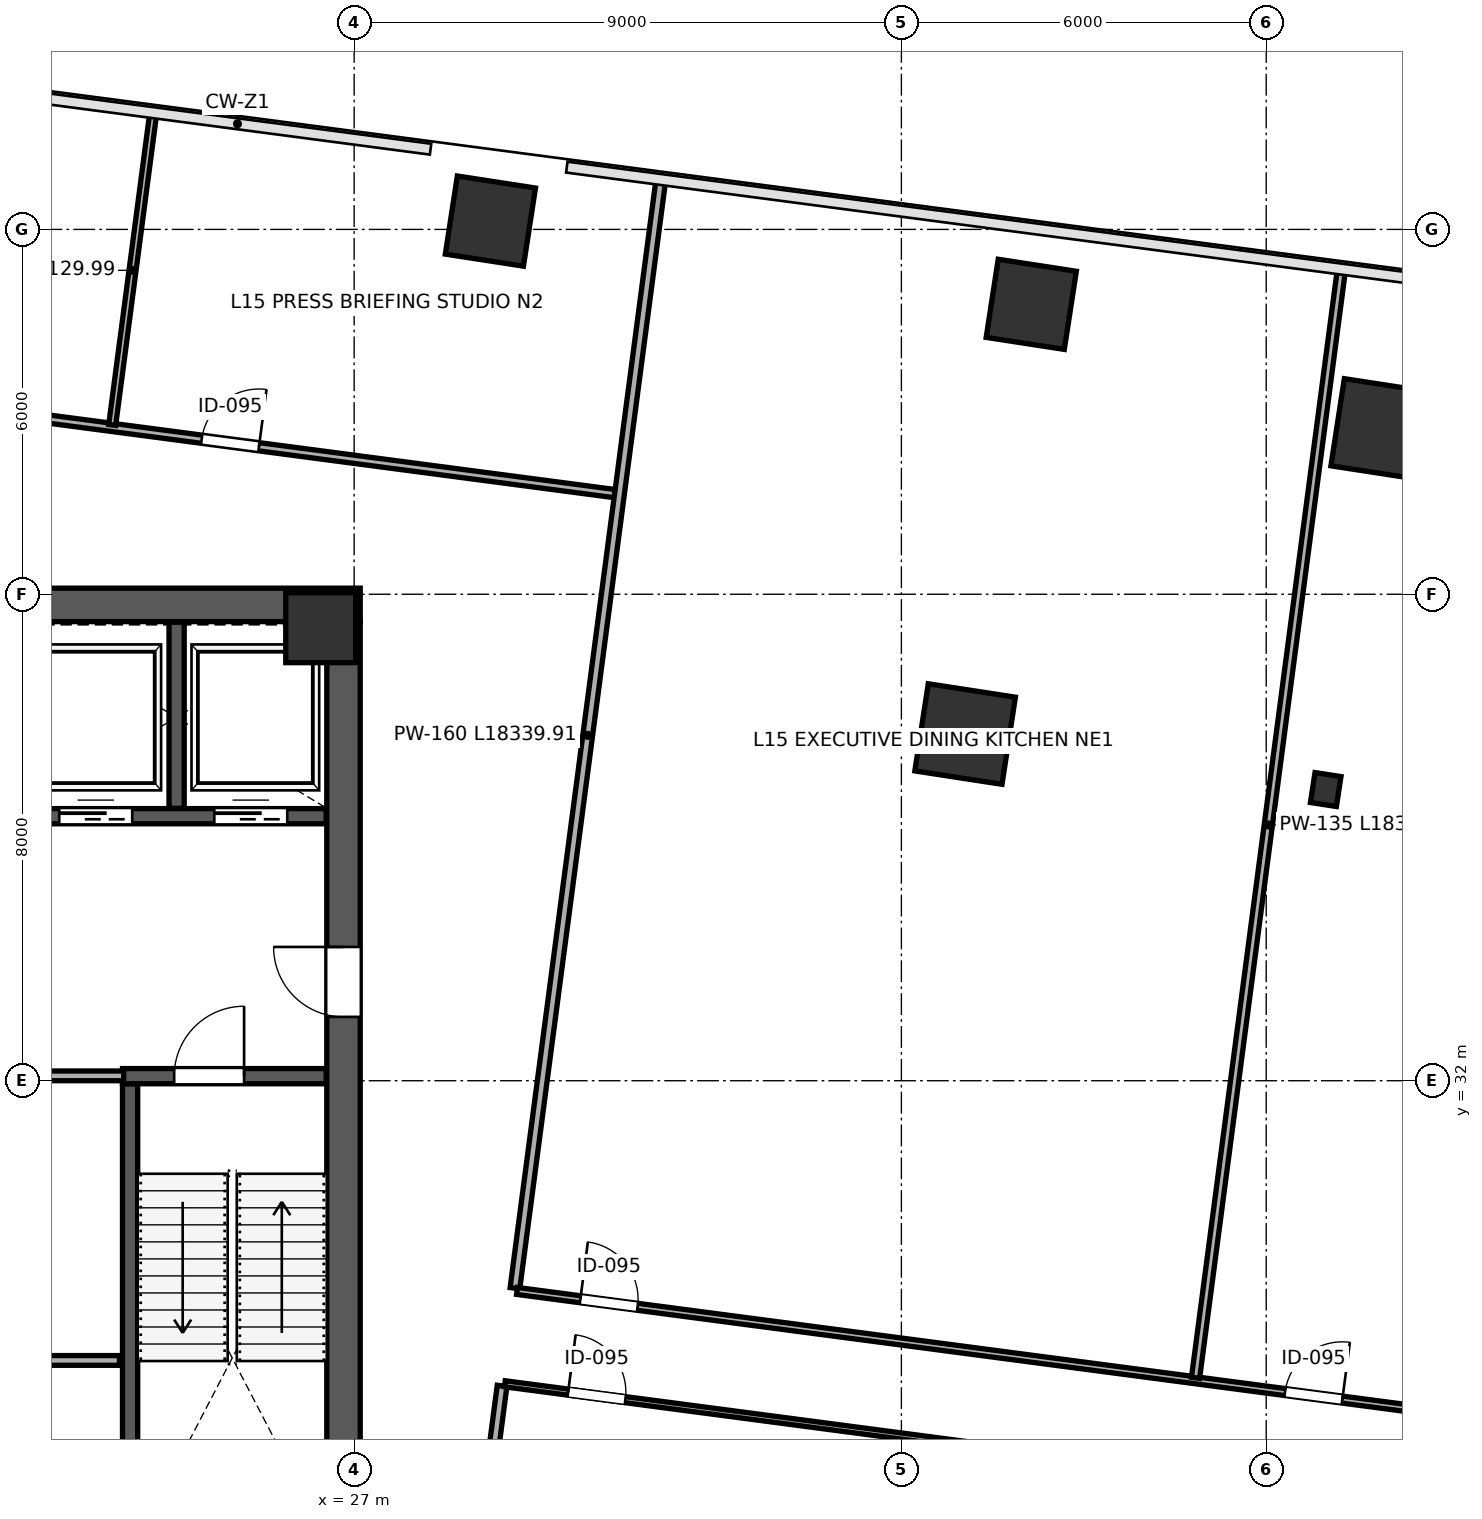
"""IFC4 building model, lengths in metres.
Left out: names, types, materials, properties, quantities, classifications, styles, units other than length and angle.
Written with IfcOpenShell. Run it as: python <this file> out.ifc"""

import sys

from ifc_helpers import new_model, si_unit, direction, frame, frame_2d, origin, origin_2d, place, context, subcontext, project, spatial, rectangle, i_section, extrude, clip, halfspace, source, transform, mapped, element, fill, save


model = new_model("IFC4")
c1 = context("Model", 3, precision=1e-05, world=origin(), true_north=direction((0.0, 1.0)))
c2 = subcontext(c1, "Body", "Model", "MODEL_VIEW")
j1 = project(units=[si_unit("LENGTHUNIT", "METRE"), si_unit("PLANEANGLEUNIT", "RADIAN")], contexts=[c1])
p1 = place(None, origin())
s1 = spatial("IfcSite", under=j1, at=p1, CompositionType="ELEMENT")
p2 = place(p1, origin())
s2 = spatial("IfcBuilding", under=s1, at=p2, CompositionType="ELEMENT")
p3 = place(p2, frame((0.0, 0.0, 70.6)))
s3 = spatial("IfcBuildingStorey", under=s2, at=p3, CompositionType="ELEMENT", Elevation=70.6)
m1 = source(origin(), c2, "Body", "SweptSolid", [
    extrude(rectangle(XDim=1.15, YDim=1.15, at=origin_2d()), origin(), (0.0, 0.0, 1.0), 4.198),
])
p4 = place(p3, frame((26.45, 39.45, 0.001), z_axis=(0.0, 0.0, 1.0), x_axis=(1.0, 0.0, 0.0)))
e1 = element("IfcColumn", 1, at=p4, inside=s3, PredefinedType="COLUMN", context=c2, shape_type="MappedRepresentation", body=[
    mapped(m1, transform((0.0, 0.0, 0.0), scale=1.0)),
])
p5 = place(p3, frame((29.241, 46.137, 0.0), z_axis=(0.072698336794, -0.04083850792, 0.996517520216), x_axis=(-0.61623373126, -0.787461166869, 0.012684602109)))
e2 = element("IfcColumn", 2, at=p5, inside=s3, PredefinedType="COLUMN", context=c2, shape_type="Clipping", body=[
    clip(clip(extrude(rectangle(XDim=1.3, YDim=1.3, at=origin_2d()), origin(), (0.0, 0.0, 1.0), 4.215), halfspace(frame((0.0, 0.0, 0.063), z_axis=(0.0, 0.0, -1.0), x_axis=(1.0, 0.0, 0.0)), False)), halfspace(frame((0.0, 0.0, 4.152), z_axis=(0.0, 0.0, 1.0), x_axis=(1.0, 0.0, 0.0)), False)),
])
p6 = place(p3, frame((37.048, 37.701, 0.0), z_axis=(0.028668122847, -0.080791982568, 0.996318620866), x_axis=(-0.982143590561, -0.18768030183, 0.013041158884)))
e3 = element("IfcColumn", 3, at=p6, inside=s3, PredefinedType="COLUMN", context=c2, shape_type="Clipping", body=[
    clip(clip(extrude(rectangle(XDim=1.45, YDim=1.45, at=origin_2d()), origin(), (0.0, 0.0, 1.0), 4.216), halfspace(frame((0.0, 0.0, 0.072), z_axis=(0.0, 0.0, -1.0), x_axis=(1.0, 0.0, 0.0)), False)), halfspace(frame((0.0, 0.0, 4.144), z_axis=(0.0, 0.0, 1.0), x_axis=(1.0, 0.0, 0.0)), False)),
])
p7 = place(p3, frame((38.136, 44.768, 0.0), z_axis=(0.064953349582, -0.086623728669, 0.994121417137), x_axis=(-0.881477060982, -0.471939521486, 0.016470550127)))
e4 = element("IfcColumn", 4, at=p7, inside=s3, PredefinedType="COLUMN", context=c2, shape_type="Clipping", body=[
    clip(clip(extrude(rectangle(XDim=1.3, YDim=1.3, at=origin_2d()), origin(), (0.0, 0.0, 1.0), 4.225), halfspace(frame((0.0, 0.0, 0.082), z_axis=(0.0, 0.0, -1.0), x_axis=(1.0, 0.0, 0.0)), False)), halfspace(frame((0.0, 0.0, 4.143), z_axis=(0.0, 0.0, 1.0), x_axis=(1.0, 0.0, 0.0)), False)),
])
p8 = place(p3, frame((42.979, 36.788, 0.0), z_axis=(0.023447854256, -0.111117417708, 0.993530632448), x_axis=(-0.998270833842, -0.05618619741, 0.017275807401)))
e5 = element("IfcColumn", 5, at=p8, inside=s3, PredefinedType="COLUMN", context=c2, shape_type="Clipping", body=[
    clip(clip(extrude(i_section(OverallWidth=0.432, OverallDepth=0.498, WebThickness=0.056, FlangeThickness=0.089, FilletRadius=0.015, at=origin_2d()), origin(), (0.0, 0.0, 1.0), 4.227), halfspace(frame((0.0, 0.0, 0.033), z_axis=(0.0, 0.0, -1.0), x_axis=(1.0, 0.0, 0.0)), False)), halfspace(frame((0.0, 0.0, 4.195), z_axis=(0.0, 0.0, 1.0), x_axis=(1.0, 0.0, 0.0)), False)),
])
p9 = place(p3, frame((43.891, 42.719, 0.0), z_axis=(0.053962386777, -0.115938418599, 0.991789465515), x_axis=(-0.9597220403, -0.280276928816, 0.019453753756)))
e6 = element("IfcColumn", 6, at=p9, inside=s3, PredefinedType="COLUMN", context=c2, shape_type="Clipping", body=[
    clip(clip(extrude(rectangle(XDim=1.45, YDim=1.45, at=origin_2d()), origin(), (0.0, 0.0, 1.0), 4.235), halfspace(frame((0.0, 0.0, 0.107), z_axis=(0.0, 0.0, -1.0), x_axis=(1.0, 0.0, 0.0)), False)), halfspace(frame((0.0, 0.0, 4.127), z_axis=(0.0, 0.0, 1.0), x_axis=(1.0, 0.0, 0.0)), False)),
])
p10 = place(p3, frame((26.825, 24.45, 0.0), z_axis=(0.0, 0.0, 1.0), x_axis=(0.0, 1.0, 0.0)))
e7 = element("IfcWall", 7, at=p10, inside=s3, PredefinedType="SHEAR", context=c2, shape_type="SweptSolid", body=[
    extrude(rectangle(XDim=15.1, YDim=0.55, at=frame_2d((7.55, 0.0))), origin(), (0.0, 0.0, 1.0), 3.96),
])
p11 = place(p10, frame((8.6, 0.0, 0.0)))
e8 = element("IfcOpeningElement", 8, at=p11, cuts=e7, PredefinedType="OPENING", context=c2, shape_type="SweptSolid", body=[
    extrude(rectangle(XDim=1.15, YDim=2.2, at=frame_2d((0.575, 1.1))), frame((0.0, 0.285, 0.0), z_axis=(0.0, -1.0, 0.0), x_axis=(1.0, 0.0, 0.0)), (0.0, 0.0, 1.0), 0.57),
])
p12 = place(p3, frame((8.9, 39.825, 0.0), z_axis=(0.0, 0.0, 1.0), x_axis=(1.0, 0.0, 0.0)))
e9 = element("IfcWall", 9, at=p12, inside=s3, PredefinedType="SHEAR", context=c2, shape_type="SweptSolid", body=[
    extrude(rectangle(XDim=18.2, YDim=0.55, at=frame_2d((9.1, 0.0))), origin(), (0.0, 0.0, 1.0), 3.96),
])
p13 = place(p3, frame((23.315, 24.46, 0.0), z_axis=(0.0, 0.0, 1.0), x_axis=(0.0, 1.0, 0.0)))
e10 = element("IfcWall", 10, at=p13, inside=s3, PredefinedType="SHEAR", context=c2, shape_type="SweptSolid", body=[
    extrude(rectangle(XDim=7.49, YDim=0.25, at=frame_2d((3.745, 0.0))), origin(), (0.0, 0.0, 1.0), 3.96),
])
p14 = place(p3, frame((23.19, 32.075, 0.0), z_axis=(0.0, 0.0, 1.0), x_axis=(1.0, 0.0, 0.0)))
e11 = element("IfcWall", 11, at=p14, inside=s3, PredefinedType="SHEAR", context=c2, shape_type="SweptSolid", body=[
    extrude(rectangle(XDim=3.35, YDim=0.25, at=frame_2d((1.675, 0.0))), origin(), (0.0, 0.0, 1.0), 3.96),
])
p15 = place(p14, frame((0.85, 0.0, 0.0)))
e12 = element("IfcOpeningElement", 12, at=p15, cuts=e11, PredefinedType="OPENING", context=c2, shape_type="SweptSolid", body=[
    extrude(rectangle(XDim=1.15, YDim=2.2, at=frame_2d((0.575, 1.1))), frame((0.0, 0.135, 0.0), z_axis=(0.0, -1.0, 0.0), x_axis=(1.0, 0.0, 0.0)), (0.0, 0.0, 1.0), 0.27),
])
p16 = place(p3, frame((21.45, 36.35, 0.0), z_axis=(0.0, 0.0, 1.0), x_axis=(1.0, 0.0, 0.0)))
e13 = element("IfcWall", 13, at=p16, inside=s3, PredefinedType="SHEAR", context=c2, shape_type="SweptSolid", body=[
    extrude(rectangle(XDim=5.09, YDim=0.25, at=frame_2d((2.545, 0.0))), origin(), (0.0, 0.0, 1.0), 3.96),
])
p17 = place(p16, frame((0.7, 0.0, 0.0)))
e14 = element("IfcOpeningElement", 14, at=p17, cuts=e13, PredefinedType="OPENING", context=c2, shape_type="SweptSolid", body=[
    extrude(rectangle(XDim=1.2, YDim=2.2, at=frame_2d((0.6, 1.1))), frame((0.0, 0.135, 0.0), z_axis=(0.0, -1.0, 0.0), x_axis=(1.0, 0.0, 0.0)), (0.0, 0.0, 1.0), 0.27),
])
p18 = place(p16, frame((3.25, 0.0, 0.0)))
e15 = element("IfcOpeningElement", 15, at=p18, cuts=e13, PredefinedType="OPENING", context=c2, shape_type="SweptSolid", body=[
    extrude(rectangle(XDim=1.2, YDim=2.2, at=frame_2d((0.6, 1.1))), frame((0.0, 0.135, 0.0), z_axis=(0.0, -1.0, 0.0), x_axis=(1.0, 0.0, 0.0)), (0.0, 0.0, 1.0), 0.27),
])
p19 = place(p3, frame((24.08, 36.48, 0.0), z_axis=(0.0, 0.0, 1.0), x_axis=(0.0, 1.0, 0.0)))
e16 = element("IfcWall", 16, at=p19, inside=s3, PredefinedType="SHEAR", context=c2, shape_type="SweptSolid", body=[
    extrude(rectangle(XDim=3.06, YDim=0.25, at=frame_2d((1.53, 0.0))), origin(), (0.0, 0.0, 1.0), 3.96),
])
p20 = place(p3, frame((19.39, 32.08, 0.0), z_axis=(0.0, 0.0, 1.0), x_axis=(1.0, 0.0, 0.0)))
e17 = element("IfcWall", 17, at=p20, inside=s3, PredefinedType="PARTITIONING", context=c2, shape_type="SweptSolid", body=[
    extrude(rectangle(XDim=3.82, YDim=0.16, at=frame_2d((1.91, 0.0))), origin(), (0.0, 0.0, 1.0), 3.96),
])
p21 = place(p3, frame((19.42, 27.4, 0.0), z_axis=(0.0, 0.0, 1.0), x_axis=(1.0, 0.0, 0.0)))
e18 = element("IfcWall", 18, at=p21, inside=s3, PredefinedType="PARTITIONING", context=c2, shape_type="SweptSolid", body=[
    extrude(rectangle(XDim=3.72, YDim=0.16, at=frame_2d((1.86, 0.0))), origin(), (0.0, 0.0, 1.0), 3.96),
])
p22 = place(p21, frame((1.35, 0.0, 0.0)))
e19 = element("IfcOpeningElement", 19, at=p22, cuts=e18, PredefinedType="OPENING", context=c2, shape_type="SweptSolid", body=[
    extrude(rectangle(XDim=0.85, YDim=2.1, at=frame_2d((0.425, 1.05))), frame((0.0, 0.09, 0.0), z_axis=(0.0, -1.0, 0.0), x_axis=(1.0, 0.0, 0.0)), (0.0, 0.0, 1.0), 0.18),
])
p23 = place(p3, frame((5.546, 45.044, 0.0), z_axis=(0.0, 0.0, 1.0), x_axis=(0.99144534416, -0.13052252504, 0.0)))
e20 = element("IfcWall", 20, at=p23, inside=s3, PredefinedType="PARTITIONING", context=c2, shape_type="SweptSolid", body=[
    extrude(rectangle(XDim=26.0, YDim=0.135, at=frame_2d((13.0, 0.0))), origin(), (0.0, 0.0, 1.0), 3.96),
])
p24 = place(p23, frame((0.91, 0.0, 0.0)))
e21 = element("IfcOpeningElement", 21, at=p24, cuts=e20, PredefinedType="OPENING", context=c2, shape_type="SweptSolid", body=[
    extrude(rectangle(XDim=0.95, YDim=2.15, at=frame_2d((0.475, 1.075))), frame((0.0, 0.078, 0.0), z_axis=(0.0, -1.0, 0.0), x_axis=(1.0, 0.0, 0.0)), (0.0, 0.0, 1.0), 0.155),
])
p25 = place(p23, frame((19.11, 0.0, 0.0)))
e22 = element("IfcOpeningElement", 22, at=p25, cuts=e20, PredefinedType="OPENING", context=c2, shape_type="SweptSolid", body=[
    extrude(rectangle(XDim=0.95, YDim=2.15, at=frame_2d((0.475, 1.075))), frame((0.0, 0.078, 0.0), z_axis=(0.0, -1.0, 0.0), x_axis=(1.0, 0.0, 0.0)), (0.0, 0.0, 1.0), 0.155),
])
p26 = place(p3, frame((23.021, 42.784, 0.0), z_axis=(0.0, 0.0, 1.0), x_axis=(0.130539454953, 0.991443115212, 0.0)))
e23 = element("IfcWall", 23, at=p26, inside=s3, PredefinedType="PARTITIONING", context=c2, shape_type="SweptSolid", body=[
    extrude(rectangle(XDim=5.13, YDim=0.115, at=frame_2d((2.565, 0.0))), origin(), (0.0, 0.0, 1.0), 3.095),
])
p27 = place(p3, frame((29.644, 28.588, 0.0), z_axis=(0.0, 0.0, 1.0), x_axis=(0.130525105318, 0.991445004467, 0.0)))
e24 = element("IfcWall", 24, at=p27, inside=s3, PredefinedType="PARTITIONING", context=c2, shape_type="SweptSolid", body=[
    extrude(rectangle(XDim=18.34, YDim=0.16, at=frame_2d((9.17, 0.0))), origin(), (0.0, 0.0, 1.0), 3.095),
])
p28 = place(p3, frame((27.595, 13.022, 0.0), z_axis=(0.0, 0.0, 1.0), x_axis=(0.130532558102, 0.991444023269, 0.0)))
e25 = element("IfcWall", 25, at=p28, inside=s3, PredefinedType="PARTITIONING", context=c2, shape_type="SweptSolid", body=[
    extrude(rectangle(XDim=14.08, YDim=0.16, at=frame_2d((7.04, 0.0))), origin(), (0.0, 0.0, 1.0), 3.96),
])
p29 = place(p3, frame((29.679, 28.543, 0.0), z_axis=(0.0, 0.0, 1.0), x_axis=(0.991444714197, -0.130527310133, 0.0)))
e26 = element("IfcWall", 26, at=p29, inside=s3, PredefinedType="PARTITIONING", context=c2, shape_type="SweptSolid", body=[
    extrude(rectangle(XDim=33.66, YDim=0.115, at=frame_2d((16.83, 0.0))), origin(), (0.0, 0.0, 1.0), 3.095),
])
p30 = place(p29, frame((1.05, 0.0, 0.0)))
e27 = element("IfcOpeningElement", 27, at=p30, cuts=e26, PredefinedType="OPENING", context=c2, shape_type="SweptSolid", body=[
    extrude(rectangle(XDim=0.95, YDim=2.15, at=frame_2d((0.475, 1.075))), frame((0.0, 0.067, 0.0), z_axis=(0.0, -1.0, 0.0), x_axis=(1.0, 0.0, 0.0)), (0.0, 0.0, 1.0), 0.135),
])
p31 = place(p29, frame((12.74, 0.0, 0.0)))
e28 = element("IfcOpeningElement", 28, at=p31, cuts=e26, PredefinedType="OPENING", context=c2, shape_type="SweptSolid", body=[
    extrude(rectangle(XDim=0.95, YDim=2.15, at=frame_2d((0.475, 1.075))), frame((0.0, 0.067, 0.0), z_axis=(0.0, -1.0, 0.0), x_axis=(1.0, 0.0, 0.0)), (0.0, 0.0, 1.0), 0.135),
])
p32 = place(p29, frame((24.04, 0.0, 0.0)))
e29 = element("IfcOpeningElement", 29, at=p32, cuts=e26, PredefinedType="OPENING", context=c2, shape_type="SweptSolid", body=[
    extrude(rectangle(XDim=0.95, YDim=2.15, at=frame_2d((0.475, 1.075))), frame((0.0, 0.067, 0.0), z_axis=(0.0, -1.0, 0.0), x_axis=(1.0, 0.0, 0.0)), (0.0, 0.0, 1.0), 0.135),
])
p33 = place(p3, frame((29.478, 27.016, 0.0), z_axis=(0.0, 0.0, 1.0), x_axis=(0.991444590622, -0.130528248771, 0.0)))
e30 = element("IfcWall", 30, at=p33, inside=s3, PredefinedType="PARTITIONING", context=c2, shape_type="SweptSolid", body=[
    extrude(rectangle(XDim=33.66, YDim=0.1, at=frame_2d((16.83, 0.0))), origin(), (0.0, 0.0, 1.0), 3.095),
])
p34 = place(p33, frame((1.05, 0.0, 0.0)))
e31 = element("IfcOpeningElement", 31, at=p34, cuts=e30, PredefinedType="OPENING", context=c2, shape_type="SweptSolid", body=[
    extrude(rectangle(XDim=0.95, YDim=2.15, at=frame_2d((0.475, 1.075))), frame((0.0, 0.06, 0.0), z_axis=(0.0, -1.0, 0.0), x_axis=(1.0, 0.0, 0.0)), (0.0, 0.0, 1.0), 0.12),
])
p35 = place(p33, frame((18.39, 0.0, 0.0)))
e32 = element("IfcOpeningElement", 32, at=p35, cuts=e30, PredefinedType="OPENING", context=c2, shape_type="SweptSolid", body=[
    extrude(rectangle(XDim=0.95, YDim=2.15, at=frame_2d((0.475, 1.075))), frame((0.0, 0.06, 0.0), z_axis=(0.0, -1.0, 0.0), x_axis=(1.0, 0.0, 0.0)), (0.0, 0.0, 1.0), 0.12),
])
p36 = place(p3, frame((40.838, 27.114, 0.0), z_axis=(0.0, 0.0, 1.0), x_axis=(0.130538190585, 0.991443281685, 0.0)))
e33 = element("IfcWall", 33, at=p36, inside=s3, PredefinedType="PARTITIONING", context=c2, shape_type="SweptSolid", body=[
    extrude(rectangle(XDim=18.34, YDim=0.135, at=frame_2d((9.17, 0.0))), origin(), (0.0, 0.0, 1.0), 3.96),
])
m2 = source(origin(), c2, "Body", "SweptSolid", [
    extrude(rectangle(XDim=1.15, YDim=2.2, at=frame_2d((0.575, 1.1))), frame((0.0, 0.025, 0.0), z_axis=(0.0, -1.0, 0.0), x_axis=(1.0, 0.0, 0.0)), (0.0, 0.0, 1.0), 0.05),
])
p37 = place(p15, origin())
e34 = element("IfcDoor", 34, at=p37, inside=s3, OperationType="SINGLE_SWING_RIGHT", PredefinedType="DOOR", context=c2, shape_type="MappedRepresentation", body=[
    mapped(m2, transform((0.0, 0.0, 0.0), scale=1.0)),
])
fill(e12, e34)
m3 = source(origin(), c2, "Body", "SweptSolid", [
    extrude(rectangle(XDim=1.15, YDim=2.2, at=frame_2d((0.575, 1.1))), frame((0.0, 0.025, 0.0), z_axis=(0.0, -1.0, 0.0), x_axis=(1.0, 0.0, 0.0)), (0.0, 0.0, 1.0), 0.05),
])
p38 = place(p11, origin())
e35 = element("IfcDoor", 35, at=p38, inside=s3, OperationType="SINGLE_SWING_RIGHT", PredefinedType="DOOR", context=c2, shape_type="MappedRepresentation", body=[
    mapped(m3, transform((0.0, 0.0, 0.0), scale=1.0)),
])
fill(e8, e35)
m4 = source(origin(), c2, "Body", "SweptSolid", [
    extrude(rectangle(XDim=1.2, YDim=2.2, at=frame_2d((0.6, 1.1))), frame((0.0, 0.025, 0.0), z_axis=(0.0, -1.0, 0.0), x_axis=(1.0, 0.0, 0.0)), (0.0, 0.0, 1.0), 0.05),
])
p39 = place(p17, origin())
e36 = element("IfcDoor", 36, at=p39, inside=s3, OperationType="SLIDING_TO_LEFT", PredefinedType="DOOR", context=c2, shape_type="MappedRepresentation", body=[
    mapped(m4, transform((0.0, 0.0, 0.0), scale=1.0)),
])
fill(e14, e36)
p40 = place(p18, origin())
e37 = element("IfcDoor", 37, at=p40, inside=s3, OperationType="SLIDING_TO_RIGHT", PredefinedType="DOOR", context=c2, shape_type="MappedRepresentation", body=[
    mapped(m4, transform((0.0, 0.0, 0.0), scale=1.0)),
])
fill(e15, e37)
m5 = source(origin(), c2, "Body", "SweptSolid", [
    extrude(rectangle(XDim=0.95, YDim=2.15, at=frame_2d((0.475, 1.075))), frame((0.0, 0.025, 0.0), z_axis=(0.0, -1.0, 0.0), x_axis=(1.0, 0.0, 0.0)), (0.0, 0.0, 1.0), 0.05),
])
p41 = place(p25, origin())
e38 = element("IfcDoor", 38, at=p41, inside=s3, OperationType="SINGLE_SWING_RIGHT", PredefinedType="DOOR", context=c2, shape_type="MappedRepresentation", body=[
    mapped(m5, transform((0.0, 0.0, 0.0), scale=1.0)),
])
fill(e22, e38)
p42 = place(p30, origin())
e39 = element("IfcDoor", 39, at=p42, inside=s3, OperationType="SINGLE_SWING_LEFT", PredefinedType="DOOR", context=c2, shape_type="MappedRepresentation", body=[
    mapped(m5, transform((0.0, 0.0, 0.0), scale=1.0)),
])
fill(e27, e39)
p43 = place(p31, origin())
e40 = element("IfcDoor", 40, at=p43, inside=s3, OperationType="SINGLE_SWING_RIGHT", PredefinedType="DOOR", context=c2, shape_type="MappedRepresentation", body=[
    mapped(m5, transform((0.0, 0.0, 0.0), scale=1.0)),
])
fill(e28, e40)
p44 = place(p34, origin())
e41 = element("IfcDoor", 41, at=p44, inside=s3, OperationType="SINGLE_SWING_LEFT", PredefinedType="DOOR", context=c2, shape_type="MappedRepresentation", body=[
    mapped(m5, transform((0.0, 0.0, 0.0), scale=1.0)),
])
fill(e31, e41)
save(model, sys.argv[1])
